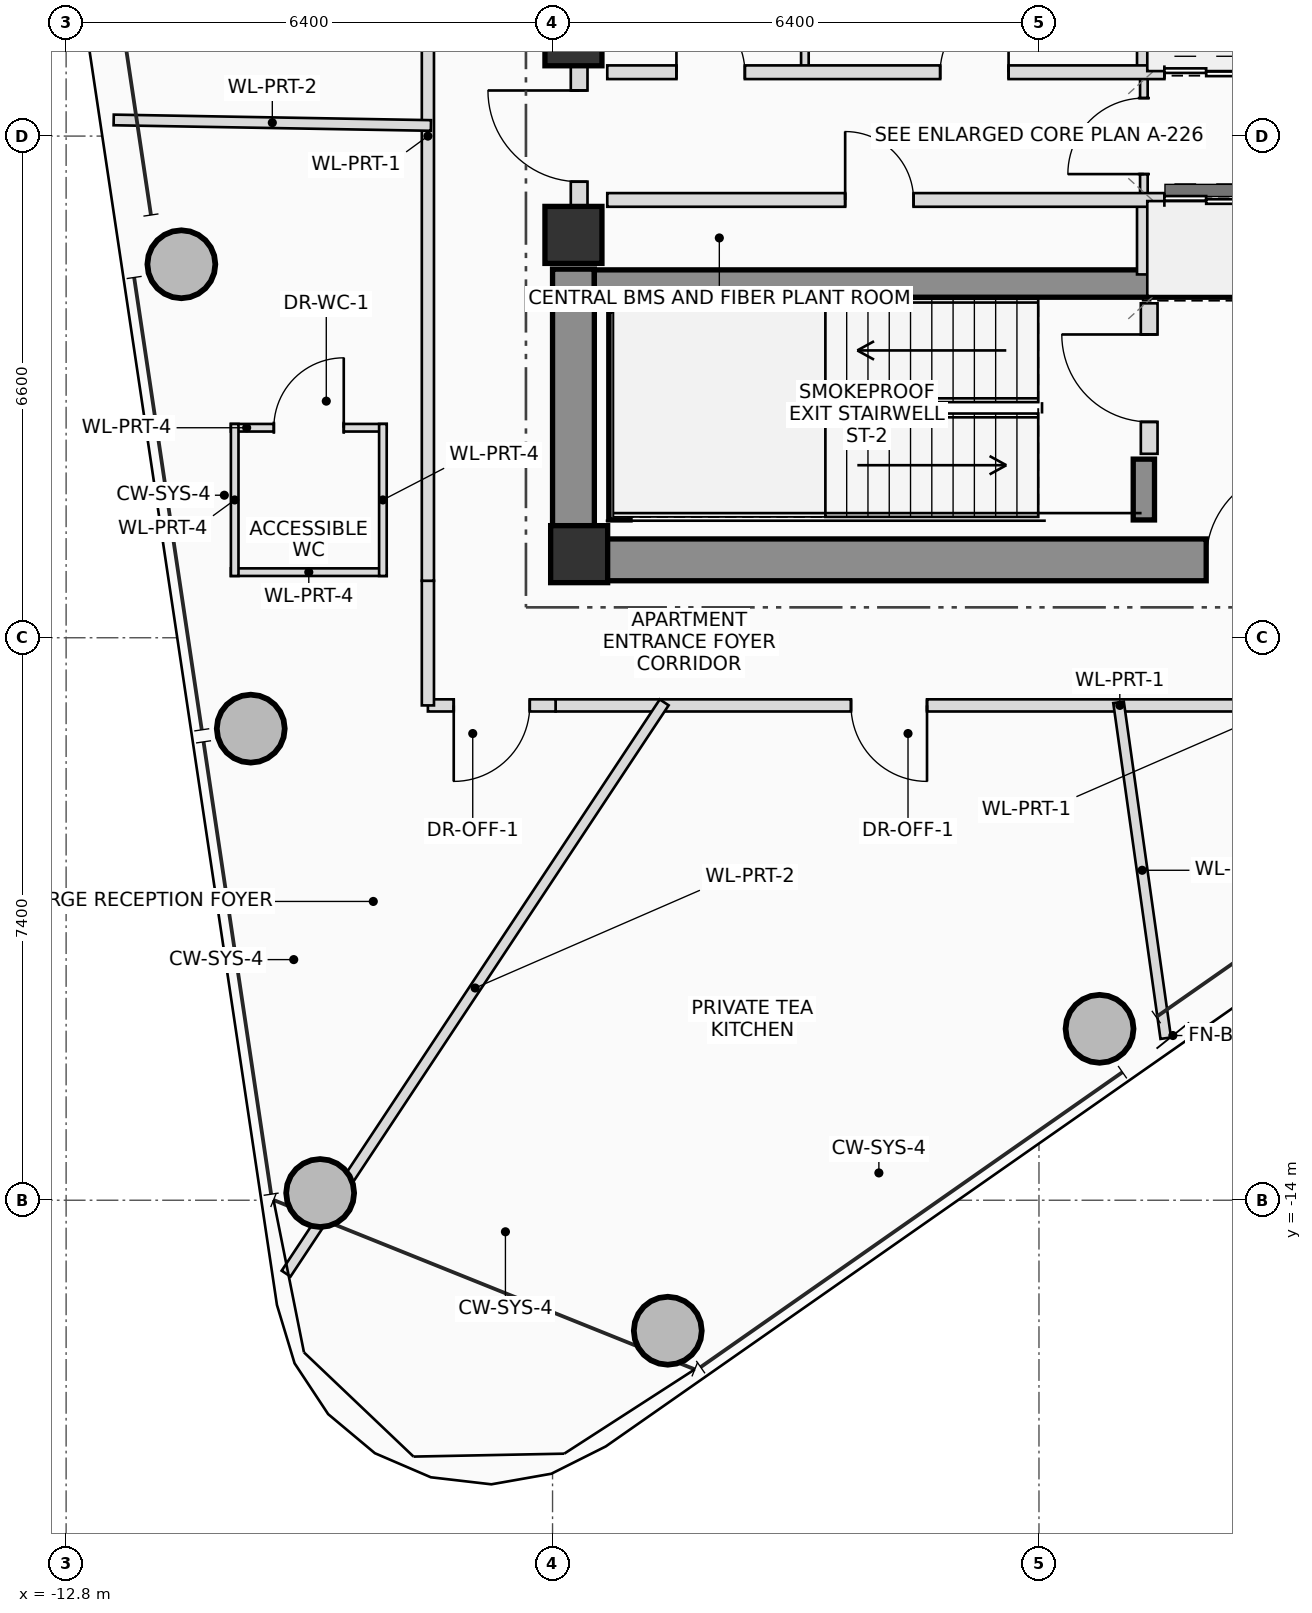
"""IFC4 building model, lengths in metres.
Left out: names, types, materials, properties, quantities, classifications, styles, units other than length and angle.
Written with IfcOpenShell. Run it as: python <this file> out.ifc"""

import sys

from ifc_helpers import new_model, si_unit, direction, frame, frame_2d, origin, origin_2d, place, context, subcontext, project, spatial, rectangle, hollow_circle, extrude, source, transform, mapped, element, fill, save


model = new_model("IFC4")
c1 = context("Model", 3, precision=1e-05, world=origin(), true_north=direction((0.0, 1.0)))
c2 = subcontext(c1, "Body", "Model", "MODEL_VIEW")
j1 = project(units=[si_unit("LENGTHUNIT", "METRE"), si_unit("PLANEANGLEUNIT", "RADIAN")], contexts=[c1])
p1 = place(None, origin())
s1 = spatial("IfcSite", under=j1, at=p1, CompositionType="ELEMENT")
p2 = place(p1, origin())
s2 = spatial("IfcBuilding", under=s1, at=p2, CompositionType="ELEMENT")
p3 = place(p2, frame((0.0, 0.0, 281.35)))
s3 = spatial("IfcBuildingStorey", under=s2, at=p3, CompositionType="ELEMENT", Elevation=281.35)
m1 = source(origin(), c2, "Body", "SweptSolid", [
    extrude(rectangle(XDim=0.75, YDim=0.75, at=origin_2d()), origin(), (0.0, 0.0, 1.0), 3.4),
])
p4 = place(p3, frame((-6.05, -5.5, 0.0), z_axis=(0.0, 0.0, 1.0), x_axis=(1.0, 0.0, 0.0)))
e1 = element("IfcColumn", 1, at=p4, inside=s3, PredefinedType="COLUMN", context=c2, shape_type="MappedRepresentation", body=[
    mapped(m1, transform((0.0, 0.0, 0.0), scale=1.0)),
])
p5 = place(p3, frame((-6.4, -5.575, 0.0), z_axis=(0.0, 0.0, 1.0), x_axis=(1.0, 0.0, 0.0)))
e2 = element("IfcWall", 2, at=p5, inside=s3, PredefinedType="SHEAR", context=c2, shape_type="SweptSolid", body=[
    extrude(rectangle(XDim=12.8, YDim=0.55, at=frame_2d((6.4, 0.0))), origin(), (0.0, 0.0, 1.0), 3.4),
])
p6 = place(p5, frame((8.6, 0.0, 0.0)))
e3 = element("IfcOpeningElement", 3, at=p6, cuts=e2, PredefinedType="OPENING", context=c2, shape_type="SweptSolid", body=[
    extrude(rectangle(XDim=1.2, YDim=2.2, at=frame_2d((0.6, 1.1))), frame((0.0, 0.285, 0.0), z_axis=(0.0, -1.0, 0.0), x_axis=(1.0, 0.0, 0.0)), (0.0, 0.0, 1.0), 0.57),
])
p7 = place(p3, frame((-6.125, -5.3, 0.0), z_axis=(0.0, 0.0, 1.0), x_axis=(0.0, 1.0, 0.0)))
e4 = element("IfcWall", 4, at=p7, inside=s3, PredefinedType="SHEAR", context=c2, shape_type="SweptSolid", body=[
    extrude(rectangle(XDim=3.55, YDim=0.55, at=frame_2d((1.775, 0.0))), origin(), (0.0, 0.0, 1.0), 3.4),
])
p8 = place(p3, frame((-5.85, -1.94, 0.0), z_axis=(0.0, 0.0, 1.0), x_axis=(1.0, 0.0, 0.0)))
e5 = element("IfcWall", 5, at=p8, inside=s3, PredefinedType="SHEAR", context=c2, shape_type="SweptSolid", body=[
    extrude(rectangle(XDim=11.7, YDim=0.36, at=frame_2d((5.85, 0.0))), origin(), (0.0, 0.0, 1.0), 3.4),
])
p9 = place(p3, frame((-5.52, -5.05, 0.0), z_axis=(0.0, 0.0, 1.0), x_axis=(0.0, 1.0, 0.0)))
e6 = element("IfcWall", 6, at=p9, inside=s3, PredefinedType="SHEAR", context=c2, shape_type="SweptSolid", body=[
    extrude(rectangle(XDim=2.75, YDim=0.28, at=frame_2d((1.375, 0.0))), origin(), (0.0, 0.0, 1.0), 3.4),
])
p10 = place(p3, frame((1.38, -5.05, 0.0), z_axis=(0.0, 0.0, 1.0), x_axis=(0.0, 1.0, 0.0)))
e7 = element("IfcWall", 7, at=p10, inside=s3, PredefinedType="SHEAR", context=c2, shape_type="SweptSolid", body=[
    extrude(rectangle(XDim=0.8, YDim=0.28, at=frame_2d((0.4, 0.0))), origin(), (0.0, 0.0, 1.0), 3.4),
])
for number, where, z_axis, x_axis in (
    (8, (-6.125, -1.3, 0.0), (0.0, 0.0, 1.0), (1.0, 0.0, 0.0)),
    (9, (-6.125, 1.3, 0.0), (0.0, 0.0, 1.0), (1.0, 0.0, 0.0)),
):
    element("IfcColumn", number, at=place(p3, frame(where, z_axis=z_axis, x_axis=x_axis)), inside=s3, PredefinedType="COLUMN", context=c2, shape_type="MappedRepresentation", body=[
        mapped(m1, transform((0.0, 0.0, 0.0), scale=1.0)),
    ])
m2 = source(origin(), c2, "Body", "SweptSolid", [
    extrude(hollow_circle(Radius=0.45, WallThickness=0.032, at=origin_2d()), origin(), (0.0, 0.0, 1.0), 3.4),
])
for number, where, z_axis, x_axis in (
    (10, (-4.884, -15.717, 0.0), (0.0, 0.0, 1.0), (1.0, 0.0, 0.0)),
    (11, (0.797, -11.745, 0.0), (0.0, 0.0, 1.0), (1.0, 0.0, 0.0)),
    (12, (-11.284, -1.686, 0.0), (0.0, 0.0, 1.0), (1.0, 0.0, 0.0)),
    (13, (-10.371, -7.796, 0.0), (0.0, 0.0, 1.0), (1.0, 0.0, 0.0)),
    (14, (-9.458, -13.905, 0.0), (0.0, 0.0, 1.0), (1.0, 0.0, 0.0)),
):
    element("IfcColumn", number, at=place(p3, frame(where, z_axis=z_axis, x_axis=x_axis)), inside=s3, PredefinedType="COLUMN", context=c2, shape_type="MappedRepresentation", body=[
        mapped(m2, transform((0.0, 0.0, 0.0), scale=1.0)),
    ])
p11 = place(p3, frame((-6.05, -0.95, 0.0), z_axis=(0.0, 0.0, 1.0), x_axis=(0.0, 1.0, 0.0)))
e15 = element("IfcWall", 15, at=p11, inside=s3, PredefinedType="PLUMBINGWALL", context=c2, shape_type="SweptSolid", body=[
    extrude(rectangle(XDim=1.9, YDim=0.22, at=frame_2d((0.95, 0.0))), origin(), (0.0, 0.0, 1.0), 2.14),
])
p12 = place(p11, frame((0.35, 0.0, 0.0)))
e16 = element("IfcOpeningElement", 16, at=p12, cuts=e15, PredefinedType="OPENING", context=c2, shape_type="SweptSolid", body=[
    extrude(rectangle(XDim=1.2, YDim=2.2, at=frame_2d((0.6, 1.1))), frame((0.0, 0.12, 0.0), z_axis=(0.0, -1.0, 0.0), x_axis=(1.0, 0.0, 0.0)), (0.0, 0.0, 1.0), 0.24),
])
p13 = place(p3, frame((1.45, -4.18, 0.0), z_axis=(0.0, 0.0, 1.0), x_axis=(0.0, 1.0, 0.0)))
e17 = element("IfcWall", 17, at=p13, inside=s3, PredefinedType="PLUMBINGWALL", context=c2, shape_type="SweptSolid", body=[
    extrude(rectangle(XDim=1.98, YDim=0.22, at=frame_2d((0.99, 0.0))), origin(), (0.0, 0.0, 1.0), 3.16),
])
p14 = place(p13, frame((0.42, 0.0, 0.0)))
e18 = element("IfcOpeningElement", 18, at=p14, cuts=e17, PredefinedType="OPENING", context=c2, shape_type="SweptSolid", body=[
    extrude(rectangle(XDim=1.15, YDim=2.15, at=frame_2d((0.575, 1.075))), frame((0.0, 0.12, 0.0), z_axis=(0.0, -1.0, 0.0), x_axis=(1.0, 0.0, 0.0)), (0.0, 0.0, 1.0), 0.24),
])
p15 = place(p3, frame((1.38, -0.84, 0.0), z_axis=(0.0, 0.0, 1.0), x_axis=(0.0, 1.0, 0.0)))
e19 = element("IfcWall", 19, at=p15, inside=s3, PredefinedType="PARTITIONING", context=c2, shape_type="SweptSolid", body=[
    extrude(rectangle(XDim=1.68, YDim=0.1, at=frame_2d((0.84, 0.0))), origin(), (0.0, 0.0, 1.0), 3.16),
])
p16 = place(p15, frame((0.34, 0.0, 0.0)))
e20 = element("IfcOpeningElement", 20, at=p16, cuts=e19, PredefinedType="OPENING", context=c2, shape_type="SweptSolid", body=[
    extrude(rectangle(XDim=1.0, YDim=2.25, at=frame_2d((0.5, 1.125))), frame((0.0, 0.06, 0.0), z_axis=(0.0, -1.0, 0.0), x_axis=(1.0, 0.0, 0.0)), (0.0, 0.0, 1.0), 0.12),
])
p17 = place(p3, frame((-3.08, 0.84, 0.0), z_axis=(0.0, 0.0, 1.0), x_axis=(0.0, 1.0, 0.0)))
e21 = element("IfcWall", 21, at=p17, inside=s3, PredefinedType="PARTITIONING", context=c2, shape_type="SweptSolid", body=[
    extrude(rectangle(XDim=0.98, YDim=0.1, at=frame_2d((0.49, 0.0))), origin(), (0.0, 0.0, 1.0), 3.16),
])
for number, where, z_axis, x_axis in (
    (22, (1.38, 0.84, 0.0), (0.0, 0.0, 1.0), (0.0, 1.0, 0.0)),
    (23, (1.38, -1.82, 0.0), (0.0, 0.0, 1.0), (0.0, 1.0, 0.0)),
):
    element("IfcWall", number, at=place(p3, frame(where, z_axis=z_axis, x_axis=x_axis)), inside=s3, PredefinedType="PLUMBINGWALL", context=c2, shape_type="SweptSolid", body=[
        extrude(rectangle(XDim=0.98, YDim=0.18, at=frame_2d((0.49, 0.0))), origin(), (0.0, 0.0, 1.0), 3.16),
    ])
p18 = place(p3, frame((-5.68, 0.84, 0.0), z_axis=(0.0, 0.0, 1.0), x_axis=(1.0, 0.0, 0.0)))
e24 = element("IfcWall", 24, at=p18, inside=s3, PredefinedType="PLUMBINGWALL", context=c2, shape_type="SweptSolid", body=[
    extrude(rectangle(XDim=10.26, YDim=0.18, at=frame_2d((5.13, 0.0))), origin(), (0.0, 0.0, 1.0), 3.16),
])
p19 = place(p18, frame((0.91, 0.0, 0.0)))
e25 = element("IfcOpeningElement", 25, at=p19, cuts=e24, PredefinedType="OPENING", context=c2, shape_type="SweptSolid", body=[
    extrude(rectangle(XDim=0.9, YDim=2.05, at=frame_2d((0.45, 1.025))), frame((0.0, 0.1, 0.0), z_axis=(0.0, -1.0, 0.0), x_axis=(1.0, 0.0, 0.0)), (0.0, 0.0, 1.0), 0.2),
])
p20 = place(p18, frame((4.38, 0.0, 0.0)))
e26 = element("IfcOpeningElement", 26, at=p20, cuts=e24, PredefinedType="OPENING", context=c2, shape_type="SweptSolid", body=[
    extrude(rectangle(XDim=0.9, YDim=2.05, at=frame_2d((0.45, 1.025))), frame((0.0, 0.1, 0.0), z_axis=(0.0, -1.0, 0.0), x_axis=(1.0, 0.0, 0.0)), (0.0, 0.0, 1.0), 0.2),
])
p21 = place(p18, frame((7.33, 0.0, 0.0)))
e27 = element("IfcOpeningElement", 27, at=p21, cuts=e24, PredefinedType="OPENING", context=c2, shape_type="SweptSolid", body=[
    extrude(rectangle(XDim=1.1, YDim=2.2, at=frame_2d((0.55, 1.1))), frame((0.0, 0.1, 0.0), z_axis=(0.0, -1.0, 0.0), x_axis=(1.0, 0.0, 0.0)), (0.0, 0.0, 1.0), 0.2),
])
p22 = place(p18, frame((8.83, 0.0, 0.0)))
e28 = element("IfcOpeningElement", 28, at=p22, cuts=e24, PredefinedType="OPENING", context=c2, shape_type="SweptSolid", body=[
    extrude(rectangle(XDim=1.1, YDim=2.2, at=frame_2d((0.55, 1.1))), frame((0.0, 0.1, 0.0), z_axis=(0.0, -1.0, 0.0), x_axis=(1.0, 0.0, 0.0)), (0.0, 0.0, 1.0), 0.2),
])
p23 = place(p3, frame((-5.68, -0.84, 0.0), z_axis=(0.0, 0.0, 1.0), x_axis=(1.0, 0.0, 0.0)))
e29 = element("IfcWall", 29, at=p23, inside=s3, PredefinedType="PLUMBINGWALL", context=c2, shape_type="SweptSolid", body=[
    extrude(rectangle(XDim=8.7, YDim=0.18, at=frame_2d((4.35, 0.0))), origin(), (0.0, 0.0, 1.0), 3.16),
])
p24 = place(p23, frame((3.13, 0.0, 0.0)))
e30 = element("IfcOpeningElement", 30, at=p24, cuts=e29, PredefinedType="OPENING", context=c2, shape_type="SweptSolid", body=[
    extrude(rectangle(XDim=0.9, YDim=2.05, at=frame_2d((0.45, 1.025))), frame((0.0, 0.1, 0.0), z_axis=(0.0, -1.0, 0.0), x_axis=(1.0, 0.0, 0.0)), (0.0, 0.0, 1.0), 0.2),
])
p25 = place(p23, frame((7.33, 0.0, 0.0)))
e31 = element("IfcOpeningElement", 31, at=p25, cuts=e29, PredefinedType="OPENING", context=c2, shape_type="SweptSolid", body=[
    extrude(rectangle(XDim=1.1, YDim=2.2, at=frame_2d((0.55, 1.1))), frame((0.0, 0.1, 0.0), z_axis=(0.0, -1.0, 0.0), x_axis=(1.0, 0.0, 0.0)), (0.0, 0.0, 1.0), 0.2),
])
p26 = place(p3, frame((-10.632, -3.837, 0.0), z_axis=(0.0, 0.0, 1.0), x_axis=(1.0, 0.0, 0.0)))
e32 = element("IfcWall", 32, at=p26, inside=s3, PredefinedType="PARTITIONING", context=c2, shape_type="SweptSolid", body=[
    extrude(rectangle(XDim=2.05, YDim=0.1, at=frame_2d((1.025, 0.0))), origin(), (0.0, 0.0, 1.0), 2.765),
])
p27 = place(p26, frame((0.565, 0.0, 0.0)))
e33 = element("IfcOpeningElement", 33, at=p27, cuts=e32, PredefinedType="OPENING", context=c2, shape_type="SweptSolid", body=[
    extrude(rectangle(XDim=0.92, YDim=2.1, at=frame_2d((0.46, 1.05))), frame((0.0, 0.06, 0.0), z_axis=(0.0, -1.0, 0.0), x_axis=(1.0, 0.0, 0.0)), (0.0, 0.0, 1.0), 0.12),
])
p28 = place(p3, frame((-8.582, -5.737, 0.0), z_axis=(0.0, 0.0, 1.0), x_axis=(-1.0, 0.0, 0.0)))
e34 = element("IfcWall", 34, at=p28, inside=s3, PredefinedType="PARTITIONING", context=c2, shape_type="SweptSolid", body=[
    extrude(rectangle(XDim=2.05, YDim=0.1, at=frame_2d((1.025, 0.0))), origin(), (0.0, 0.0, 1.0), 2.725),
])
p29 = place(p3, frame((-8.632, -3.787, 0.0), z_axis=(0.0, 0.0, 1.0), x_axis=(0.0, -1.0, 0.0)))
e35 = element("IfcWall", 35, at=p29, inside=s3, PredefinedType="PARTITIONING", context=c2, shape_type="SweptSolid", body=[
    extrude(rectangle(XDim=2.0, YDim=0.1, at=frame_2d((1.0, 0.0))), origin(), (0.0, 0.0, 1.0), 2.765),
])
p30 = place(p3, frame((-10.582, -5.787, 0.0), z_axis=(0.0, 0.0, 1.0), x_axis=(0.0, 1.0, 0.0)))
e36 = element("IfcWall", 36, at=p30, inside=s3, PredefinedType="PARTITIONING", context=c2, shape_type="SweptSolid", body=[
    extrude(rectangle(XDim=2.0, YDim=0.1, at=frame_2d((1.0, 0.0))), origin(), (0.0, 0.0, 1.0), 2.725),
])
p31 = place(p3, frame((3.45, -7.49, 0.0), z_axis=(0.0, 0.0, 1.0), x_axis=(-1.0, 0.0, 0.0)))
e37 = element("IfcWall", 37, at=p31, inside=s3, PredefinedType="PARTITIONING", context=c2, shape_type="SweptSolid", body=[
    extrude(rectangle(XDim=9.81, YDim=0.16, at=frame_2d((4.905, 0.0))), origin(), (0.0, 0.0, 1.0), 2.565),
])
p32 = place(p31, frame((4.923, 0.0, 0.0)))
e38 = element("IfcOpeningElement", 38, at=p32, cuts=e37, PredefinedType="OPENING", context=c2, shape_type="SweptSolid", body=[
    extrude(rectangle(XDim=1.0, YDim=2.25, at=frame_2d((0.5, 1.125))), frame((0.0, 0.09, 0.0), z_axis=(0.0, -1.0, 0.0), x_axis=(1.0, 0.0, 0.0)), (0.0, 0.0, 1.0), 0.18),
])
p33 = place(p3, frame((-6.36, -7.49, 0.0), z_axis=(0.0, 0.0, 1.0), x_axis=(-1.0, 0.0, 0.0)))
e39 = element("IfcWall", 39, at=p33, inside=s3, PredefinedType="PARTITIONING", context=c2, shape_type="SweptSolid", body=[
    extrude(rectangle(XDim=1.68, YDim=0.16, at=frame_2d((0.84, 0.0))), origin(), (0.0, 0.0, 1.0), 2.565),
])
p34 = place(p33, frame((0.34, 0.0, 0.0)))
e40 = element("IfcOpeningElement", 40, at=p34, cuts=e39, PredefinedType="OPENING", context=c2, shape_type="SweptSolid", body=[
    extrude(rectangle(XDim=1.0, YDim=2.25, at=frame_2d((0.5, 1.125))), frame((0.0, 0.09, 0.0), z_axis=(0.0, -1.0, 0.0), x_axis=(1.0, 0.0, 0.0)), (0.0, 0.0, 1.0), 0.18),
])
p35 = place(p3, frame((-8.04, -7.49, 0.0), z_axis=(0.0, 0.0, 1.0), x_axis=(0.0, 1.0, 0.0)))
e41 = element("IfcWall", 41, at=p35, inside=s3, PredefinedType="PARTITIONING", context=c2, shape_type="SweptSolid", body=[
    extrude(rectangle(XDim=1.64, YDim=0.16, at=frame_2d((0.82, 0.0))), origin(), (0.0, 0.0, 1.0), 2.565),
])
p36 = place(p3, frame((-8.04, -5.85, 0.0), z_axis=(0.0, 0.0, 1.0), x_axis=(0.0, 1.0, 0.0)))
e42 = element("IfcWall", 42, at=p36, inside=s3, PredefinedType="PARTITIONING", context=c2, shape_type="SweptSolid", body=[
    extrude(rectangle(XDim=11.7, YDim=0.16, at=frame_2d((5.85, 0.0))), origin(), (0.0, 0.0, 1.0), 2.565),
])
p37 = place(p3, frame((-8.0, 0.14, 0.0), z_axis=(0.0, 0.0, 1.0), x_axis=(-0.999848132876, 0.017427311435, 0.0)))
e43 = element("IfcWall", 43, at=p37, inside=s3, PredefinedType="PARTITIONING", context=c2, shape_type="SweptSolid", body=[
    extrude(rectangle(XDim=4.175, YDim=0.14, at=frame_2d((2.087, 0.0))), origin(), (0.0, 0.0, 1.0), 2.725),
])
p38 = place(p3, frame((-4.931, -7.45, 0.0), z_axis=(0.0, 0.0, 1.0), x_axis=(-0.551953051788, -0.833875187676, 0.0)))
e44 = element("IfcWall", 44, at=p38, inside=s3, PredefinedType="PARTITIONING", context=c2, shape_type="SweptSolid", body=[
    extrude(rectangle(XDim=9.013, YDim=0.14, at=frame_2d((4.507, 0.0))), origin(), (0.0, 0.0, 1.0), 2.565),
])
p39 = place(p3, frame((1.047, -7.45, 0.0), z_axis=(0.0, 0.0, 1.0), x_axis=(0.139153381551, -0.990270839924, 0.0)))
e45 = element("IfcWall", 45, at=p39, inside=s3, PredefinedType="PARTITIONING", context=c2, shape_type="SweptSolid", body=[
    extrude(rectangle(XDim=4.462, YDim=0.14, at=frame_2d((2.231, 0.0))), origin(), (0.0, 0.0, 1.0), 2.565),
])
p40 = place(p6, origin())
e46 = element("IfcDoor", 46, at=p40, inside=s3, OperationType="SINGLE_SWING_RIGHT", PredefinedType="DOOR", context=c2, shape_type="SweptSolid", body=[
    extrude(rectangle(XDim=1.2, YDim=2.2, at=frame_2d((0.6, 1.1))), frame((0.0, 0.025, 0.0), z_axis=(0.0, -1.0, 0.0), x_axis=(1.0, 0.0, 0.0)), (0.0, 0.0, 1.0), 0.05),
])
fill(e3, e46)
p41 = place(p12, origin())
e47 = element("IfcDoor", 47, at=p41, inside=s3, OperationType="SINGLE_SWING_RIGHT", PredefinedType="DOOR", context=c2, shape_type="SweptSolid", body=[
    extrude(rectangle(XDim=1.2, YDim=2.2, at=frame_2d((0.6, 1.1))), frame((0.0, 0.025, 0.0), z_axis=(0.0, -1.0, 0.0), x_axis=(1.0, 0.0, 0.0)), (0.0, 0.0, 1.0), 0.05),
])
fill(e16, e47)
p42 = place(p14, origin())
e48 = element("IfcDoor", 48, at=p42, inside=s3, OperationType="SINGLE_SWING_RIGHT", PredefinedType="DOOR", context=c2, shape_type="SweptSolid", body=[
    extrude(rectangle(XDim=1.15, YDim=2.15, at=frame_2d((0.575, 1.075))), frame((0.0, 0.025, 0.0), z_axis=(0.0, -1.0, 0.0), x_axis=(1.0, 0.0, 0.0)), (0.0, 0.0, 1.0), 0.05),
])
fill(e18, e48)
p43 = place(p16, origin())
e49 = element("IfcDoor", 49, at=p43, inside=s3, OperationType="SINGLE_SWING_LEFT", PredefinedType="DOOR", context=c2, shape_type="SweptSolid", body=[
    extrude(rectangle(XDim=1.0, YDim=2.25, at=frame_2d((0.5, 1.125))), frame((0.0, 0.025, 0.0), z_axis=(0.0, -1.0, 0.0), x_axis=(1.0, 0.0, 0.0)), (0.0, 0.0, 1.0), 0.05),
])
fill(e20, e49)
p44 = place(p19, origin())
e50 = element("IfcDoor", 50, at=p44, inside=s3, OperationType="SINGLE_SWING_LEFT", PredefinedType="DOOR", context=c2, shape_type="SweptSolid", body=[
    extrude(rectangle(XDim=0.9, YDim=2.05, at=frame_2d((0.45, 1.025))), frame((0.0, 0.025, 0.0), z_axis=(0.0, -1.0, 0.0), x_axis=(1.0, 0.0, 0.0)), (0.0, 0.0, 1.0), 0.05),
])
fill(e25, e50)
p45 = place(p20, origin())
e51 = element("IfcDoor", 51, at=p45, inside=s3, OperationType="SINGLE_SWING_RIGHT", PredefinedType="DOOR", context=c2, shape_type="SweptSolid", body=[
    extrude(rectangle(XDim=0.9, YDim=2.05, at=frame_2d((0.45, 1.025))), frame((0.0, 0.025, 0.0), z_axis=(0.0, -1.0, 0.0), x_axis=(1.0, 0.0, 0.0)), (0.0, 0.0, 1.0), 0.05),
])
fill(e26, e51)
p46 = place(p21, origin())
e52 = element("IfcDoor", 52, at=p46, inside=s3, OperationType="DOUBLE_DOOR_SLIDING", PredefinedType="DOOR", context=c2, shape_type="SweptSolid", body=[
    extrude(rectangle(XDim=1.1, YDim=2.2, at=frame_2d((0.55, 1.1))), frame((0.0, 0.025, 0.0), z_axis=(0.0, -1.0, 0.0), x_axis=(1.0, 0.0, 0.0)), (0.0, 0.0, 1.0), 0.05),
])
fill(e27, e52)
p47 = place(p24, origin())
e53 = element("IfcDoor", 53, at=p47, inside=s3, OperationType="SINGLE_SWING_LEFT", PredefinedType="DOOR", context=c2, shape_type="SweptSolid", body=[
    extrude(rectangle(XDim=0.9, YDim=2.05, at=frame_2d((0.45, 1.025))), frame((0.0, 0.025, 0.0), z_axis=(0.0, -1.0, 0.0), x_axis=(1.0, 0.0, 0.0)), (0.0, 0.0, 1.0), 0.05),
])
fill(e30, e53)
p48 = place(p25, origin())
e54 = element("IfcDoor", 54, at=p48, inside=s3, OperationType="DOUBLE_DOOR_SLIDING", PredefinedType="DOOR", context=c2, shape_type="SweptSolid", body=[
    extrude(rectangle(XDim=1.1, YDim=2.2, at=frame_2d((0.55, 1.1))), frame((0.0, 0.025, 0.0), z_axis=(0.0, -1.0, 0.0), x_axis=(1.0, 0.0, 0.0)), (0.0, 0.0, 1.0), 0.05),
])
fill(e31, e54)
p49 = place(p27, origin())
e55 = element("IfcDoor", 55, at=p49, inside=s3, OperationType="SINGLE_SWING_RIGHT", PredefinedType="DOOR", context=c2, shape_type="SweptSolid", body=[
    extrude(rectangle(XDim=0.92, YDim=2.1, at=frame_2d((0.46, 1.05))), frame((0.0, 0.025, 0.0), z_axis=(0.0, -1.0, 0.0), x_axis=(1.0, 0.0, 0.0)), (0.0, 0.0, 1.0), 0.05),
])
fill(e33, e55)
p50 = place(p32, origin())
e56 = element("IfcDoor", 56, at=p50, inside=s3, OperationType="SINGLE_SWING_LEFT", PredefinedType="DOOR", context=c2, shape_type="SweptSolid", body=[
    extrude(rectangle(XDim=1.0, YDim=2.25, at=frame_2d((0.5, 1.125))), frame((0.0, 0.025, 0.0), z_axis=(0.0, -1.0, 0.0), x_axis=(1.0, 0.0, 0.0)), (0.0, 0.0, 1.0), 0.05),
])
fill(e38, e56)
p51 = place(p34, origin())
e57 = element("IfcDoor", 57, at=p51, inside=s3, OperationType="SINGLE_SWING_RIGHT", PredefinedType="DOOR", context=c2, shape_type="SweptSolid", body=[
    extrude(rectangle(XDim=1.0, YDim=2.25, at=frame_2d((0.5, 1.125))), frame((0.0, 0.025, 0.0), z_axis=(0.0, -1.0, 0.0), x_axis=(1.0, 0.0, 0.0)), (0.0, 0.0, 1.0), 0.05),
])
fill(e40, e57)
save(model, sys.argv[1])
